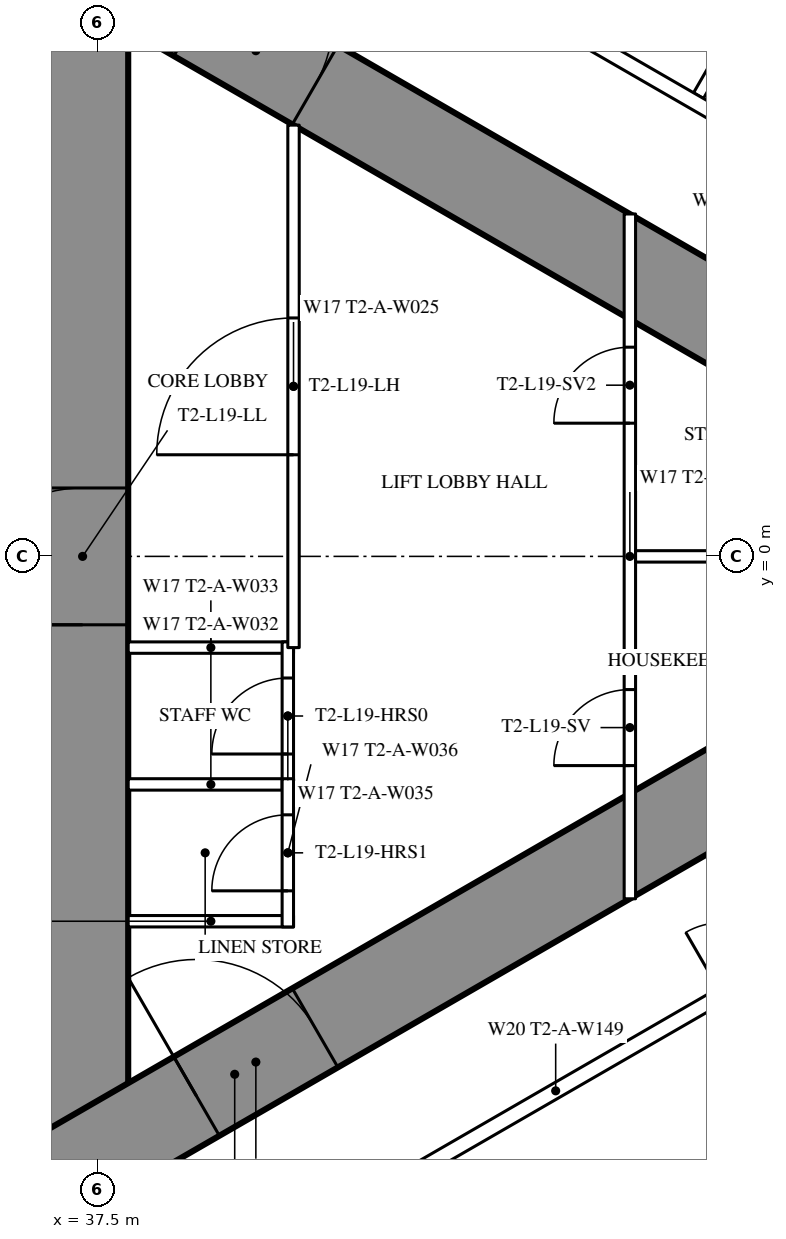
"""IFC4 building model, lengths in metres.
Left out: names, types, materials, properties, quantities, classifications, styles, units other than length and angle.
Written with IfcOpenShell. Run it as: python <this file> out.ifc"""

import sys

from ifc_helpers import new_model, si_unit, direction, frame, frame_2d, origin, place, context, subcontext, project, spatial, rectangle, extrude, element, fill, save


model = new_model("IFC4")
c1 = context("Model", 3, precision=1e-05, world=origin(), true_north=direction((0.0, 1.0)))
c2 = subcontext(c1, "Body", "Model", "MODEL_VIEW")
j1 = project(units=[si_unit("LENGTHUNIT", "METRE"), si_unit("PLANEANGLEUNIT", "RADIAN")], contexts=[c1])
p1 = place(None, origin())
s1 = spatial("IfcSite", under=j1, at=p1, CompositionType="ELEMENT")
p2 = place(p1, origin())
s2 = spatial("IfcBuilding", under=s1, at=p2, CompositionType="ELEMENT")
p3 = place(p2, frame((0.0, 0.0, 74.0)))
s3 = spatial("IfcBuildingStorey", under=s2, at=p3, CompositionType="ELEMENT", Elevation=74.0)
p4 = place(p3, frame((37.3, -8.6, 0.0), z_axis=(0.0, 0.0, 1.0), x_axis=(0.0, 1.0, 0.0)))
e1 = element("IfcWall", 1, at=p4, inside=s3, PredefinedType="SHEAR", context=c2, shape_type="SweptSolid", body=[
    extrude(rectangle(XDim=17.2, YDim=1.2, at=frame_2d((8.6, 0.0))), origin(), (0.0, 0.0, 1.0), 3.5),
])
p5 = place(p4, frame((7.7, 0.0, 0.0)))
e2 = element("IfcOpeningElement", 2, at=p5, cuts=e1, PredefinedType="OPENING", context=c2, shape_type="SweptSolid", body=[
    extrude(rectangle(XDim=1.8, YDim=2.2, at=frame_2d((0.9, 1.1))), frame((0.0, 0.61, 0.0), z_axis=(0.0, -1.0, 0.0), x_axis=(1.0, 0.0, 0.0)), (0.0, 0.0, 1.0), 1.22),
])
p6 = place(p3, frame((27.2, -13.8, 0.0), z_axis=(0.0, 0.0, 1.0), x_axis=(0.866027159892, 0.499996958321, 0.0)))
e3 = element("IfcWall", 3, at=p6, inside=s3, PredefinedType="SHEAR", context=c2, shape_type="SweptSolid", body=[
    extrude(rectangle(XDim=27.947, YDim=1.2, at=frame_2d((13.973, 0.0))), origin(), (0.0, 0.0, 1.0), 3.5),
])
p7 = place(p6, frame((4.6, 0.0, 0.0)))
e4 = element("IfcOpeningElement", 4, at=p7, cuts=e3, PredefinedType="OPENING", context=c2, shape_type="SweptSolid", body=[
    extrude(rectangle(XDim=1.0, YDim=2.2, at=frame_2d((0.5, 1.1))), frame((0.0, 0.61, 0.0), z_axis=(0.0, -1.0, 0.0), x_axis=(1.0, 0.0, 0.0)), (0.0, 0.0, 1.0), 1.22),
])
p8 = place(p6, frame((13.395, 0.0, 0.0)))
e5 = element("IfcOpeningElement", 5, at=p8, cuts=e3, PredefinedType="OPENING", context=c2, shape_type="SweptSolid", body=[
    extrude(rectangle(XDim=1.8, YDim=2.2, at=frame_2d((0.9, 1.1))), frame((0.0, 0.61, 0.0), z_axis=(0.0, -1.0, 0.0), x_axis=(1.0, 0.0, 0.0)), (0.0, 0.0, 1.0), 1.22),
])
p9 = place(p3, frame((27.2, 13.8, 0.0), z_axis=(0.0, 0.0, 1.0), x_axis=(0.866024515034, -0.500001539357, 0.0)))
e6 = element("IfcWall", 6, at=p9, inside=s3, PredefinedType="SHEAR", context=c2, shape_type="SweptSolid", body=[
    extrude(rectangle(XDim=26.907, YDim=1.2, at=frame_2d((13.454, 0.0))), origin(), (0.0, 0.0, 1.0), 3.5),
])
p10 = place(p9, frame((4.6, 0.0, 0.0)))
e7 = element("IfcOpeningElement", 7, at=p10, cuts=e6, PredefinedType="OPENING", context=c2, shape_type="SweptSolid", body=[
    extrude(rectangle(XDim=1.0, YDim=2.2, at=frame_2d((0.5, 1.1))), frame((0.0, 0.61, 0.0), z_axis=(0.0, -1.0, 0.0), x_axis=(1.0, 0.0, 0.0)), (0.0, 0.0, 1.0), 1.22),
])
p11 = place(p9, frame((13.395, 0.0, 0.0)))
e8 = element("IfcOpeningElement", 8, at=p11, cuts=e6, PredefinedType="OPENING", context=c2, shape_type="SweptSolid", body=[
    extrude(rectangle(XDim=1.8, YDim=2.2, at=frame_2d((0.9, 1.1))), frame((0.0, 0.61, 0.0), z_axis=(0.0, -1.0, 0.0), x_axis=(1.0, 0.0, 0.0)), (0.0, 0.0, 1.0), 1.22),
])
p12 = place(p3, frame((45.403, 6.062, 0.0), z_axis=(0.0, 0.0, 1.0), x_axis=(0.500013434677, 0.866017647131, 0.0)))
e9 = element("IfcWall", 9, at=p12, inside=s3, PredefinedType="PARTITIONING", context=c2, shape_type="SweptSolid", body=[
    extrude(rectangle(XDim=9.902, YDim=0.15, at=frame_2d((4.951, 0.0))), origin(), (0.0, 0.0, 1.0), 2.25),
])
p13 = place(p3, frame((36.834, 10.894, 0.0), z_axis=(0.0, 0.0, 1.0), x_axis=(0.866028157229, -0.499995230863, 0.0)))
e10 = element("IfcWall", 10, at=p13, inside=s3, PredefinedType="PARTITIONING", context=c2, shape_type="SweptSolid", body=[
    extrude(rectangle(XDim=21.667, YDim=0.2, at=frame_2d((10.833, 0.0))), origin(), (0.0, 0.0, 1.0), 3.25),
])
p14 = place(p13, frame((18.885, 0.0, 0.0)))
e11 = element("IfcOpeningElement", 11, at=p14, cuts=e10, PredefinedType="OPENING", context=c2, shape_type="SweptSolid", body=[
    extrude(rectangle(XDim=0.95, YDim=2.2, at=frame_2d((0.475, 1.1))), frame((0.0, 0.11, 0.0), z_axis=(0.0, -1.0, 0.0), x_axis=(1.0, 0.0, 0.0)), (0.0, 0.0, 1.0), 0.22),
])
p15 = place(p13, frame((15.443, 0.0, 0.0)))
e12 = element("IfcOpeningElement", 12, at=p15, cuts=e10, PredefinedType="OPENING", context=c2, shape_type="SweptSolid", body=[
    extrude(rectangle(XDim=1.8, YDim=2.2, at=frame_2d((0.9, 1.1))), frame((0.0, 0.11, 0.0), z_axis=(0.0, -1.0, 0.0), x_axis=(1.0, 0.0, 0.0)), (0.0, 0.0, 1.0), 0.22),
])
p16 = place(p13, frame((12.562, 0.0, 0.0)))
e13 = element("IfcOpeningElement", 13, at=p16, cuts=e10, PredefinedType="OPENING", context=c2, shape_type="SweptSolid", body=[
    extrude(rectangle(XDim=0.95, YDim=2.2, at=frame_2d((0.475, 1.1))), frame((0.0, 0.11, 0.0), z_axis=(0.0, -1.0, 0.0), x_axis=(1.0, 0.0, 0.0)), (0.0, 0.0, 1.0), 0.22),
])
p17 = place(p13, frame((4.292, 0.0, 0.0)))
e14 = element("IfcOpeningElement", 14, at=p17, cuts=e10, PredefinedType="OPENING", context=c2, shape_type="SweptSolid", body=[
    extrude(rectangle(XDim=1.0, YDim=2.2, at=frame_2d((0.5, 1.1))), frame((0.0, 0.11, 0.0), z_axis=(0.0, -1.0, 0.0), x_axis=(1.0, 0.0, 0.0)), (0.0, 0.0, 1.0), 0.22),
])
p18 = place(p3, frame((37.96, -10.243, 0.0), z_axis=(0.0, 0.0, 1.0), x_axis=(0.866030548046, 0.499991089772, 0.0)))
e15 = element("IfcWall", 15, at=p18, inside=s3, PredefinedType="PARTITIONING", context=c2, shape_type="SweptSolid", body=[
    extrude(rectangle(XDim=12.849, YDim=0.2, at=frame_2d((6.425, 0.0))), origin(), (0.0, 0.0, 1.0), 3.25),
])
p19 = place(p18, frame((8.949, 0.0, 0.0)))
e16 = element("IfcOpeningElement", 16, at=p19, cuts=e15, PredefinedType="OPENING", context=c2, shape_type="SweptSolid", body=[
    extrude(rectangle(XDim=0.95, YDim=2.2, at=frame_2d((0.475, 1.1))), frame((0.0, 0.11, 0.0), z_axis=(0.0, -1.0, 0.0), x_axis=(1.0, 0.0, 0.0)), (0.0, 0.0, 1.0), 0.22),
])
p20 = place(p18, frame((0.6, 0.0, 0.0)))
e17 = element("IfcOpeningElement", 17, at=p20, cuts=e15, PredefinedType="OPENING", context=c2, shape_type="SweptSolid", body=[
    extrude(rectangle(XDim=0.95, YDim=2.2, at=frame_2d((0.475, 1.1))), frame((0.0, 0.11, 0.0), z_axis=(0.0, -1.0, 0.0), x_axis=(1.0, 0.0, 0.0)), (0.0, 0.0, 1.0), 0.22),
])
for number, where, z_axis, x_axis in (
    (18, (37.9, -1.2, 0.0), (0.0, 0.0, 1.0), (1.0, 0.0, 0.0)),
    (19, (37.9, -3.0, 0.0), (0.0, 0.0, 1.0), (1.0, 0.0, 0.0)),
    (20, (37.9, -4.8, 0.0), (0.0, 0.0, 1.0), (1.0, 0.0, 0.0)),
):
    element("IfcWall", number, at=place(p3, frame(where, z_axis=z_axis, x_axis=x_axis)), inside=s3, PredefinedType="PARTITIONING", context=c2, shape_type="SweptSolid", body=[
        extrude(rectangle(XDim=2.175, YDim=0.15, at=frame_2d((1.087, 0.0))), origin(), (0.0, 0.0, 1.0), 3.25),
    ])
p21 = place(p3, frame((40.0, -3.075, 0.0), z_axis=(0.0, 0.0, 1.0), x_axis=(0.0, 1.0, 0.0)))
e21 = element("IfcWall", 21, at=p21, inside=s3, PredefinedType="PARTITIONING", context=c2, shape_type="SweptSolid", body=[
    extrude(rectangle(XDim=1.95, YDim=0.15, at=frame_2d((0.975, 0.0))), origin(), (0.0, 0.0, 1.0), 3.25),
])
p22 = place(p21, frame((0.475, 0.0, 0.0)))
e22 = element("IfcOpeningElement", 22, at=p22, cuts=e21, PredefinedType="OPENING", context=c2, shape_type="SweptSolid", body=[
    extrude(rectangle(XDim=1.0, YDim=2.2, at=frame_2d((0.5, 1.1))), frame((0.0, 0.085, 0.0), z_axis=(0.0, -1.0, 0.0), x_axis=(1.0, 0.0, 0.0)), (0.0, 0.0, 1.0), 0.17),
])
p23 = place(p3, frame((40.0, -4.875, 0.0), z_axis=(0.0, 0.0, 1.0), x_axis=(0.0, 1.0, 0.0)))
e23 = element("IfcWall", 23, at=p23, inside=s3, PredefinedType="PARTITIONING", context=c2, shape_type="SweptSolid", body=[
    extrude(rectangle(XDim=1.95, YDim=0.15, at=frame_2d((0.975, 0.0))), origin(), (0.0, 0.0, 1.0), 3.25),
])
p24 = place(p23, frame((0.475, 0.0, 0.0)))
e24 = element("IfcOpeningElement", 24, at=p24, cuts=e23, PredefinedType="OPENING", context=c2, shape_type="SweptSolid", body=[
    extrude(rectangle(XDim=1.0, YDim=2.2, at=frame_2d((0.5, 1.1))), frame((0.0, 0.085, 0.0), z_axis=(0.0, -1.0, 0.0), x_axis=(1.0, 0.0, 0.0)), (0.0, 0.0, 1.0), 0.17),
])
p25 = place(p3, frame((40.075, -1.2, 0.0), z_axis=(0.0, 0.0, 1.0), x_axis=(0.0, 1.0, 0.0)))
e25 = element("IfcWall", 25, at=p25, inside=s3, PredefinedType="PARTITIONING", context=c2, shape_type="SweptSolid", body=[
    extrude(rectangle(XDim=6.874, YDim=0.15, at=frame_2d((3.437, 0.0))), origin(), (0.0, 0.0, 1.0), 3.25),
])
p26 = place(p25, frame((2.537, 0.0, 0.0)))
e26 = element("IfcOpeningElement", 26, at=p26, cuts=e25, PredefinedType="OPENING", context=c2, shape_type="SweptSolid", body=[
    extrude(rectangle(XDim=1.8, YDim=2.2, at=frame_2d((0.9, 1.1))), frame((0.0, 0.085, 0.0), z_axis=(0.0, -1.0, 0.0), x_axis=(1.0, 0.0, 0.0)), (0.0, 0.0, 1.0), 0.17),
])
p27 = place(p3, frame((44.5, -4.505, 0.0), z_axis=(0.0, 0.0, 1.0), x_axis=(0.0, 1.0, 0.0)))
e27 = element("IfcWall", 27, at=p27, inside=s3, PredefinedType="PARTITIONING", context=c2, shape_type="SweptSolid", body=[
    extrude(rectangle(XDim=9.009, YDim=0.15, at=frame_2d((4.505, 0.0))), origin(), (0.0, 0.0, 1.0), 2.45),
])
p28 = place(p27, frame((1.752, 0.0, 0.0)))
e28 = element("IfcOpeningElement", 28, at=p28, cuts=e27, PredefinedType="OPENING", context=c2, shape_type="SweptSolid", body=[
    extrude(rectangle(XDim=1.0, YDim=2.2, at=frame_2d((0.5, 1.1))), frame((0.0, 0.085, 0.0), z_axis=(0.0, -1.0, 0.0), x_axis=(1.0, 0.0, 0.0)), (0.0, 0.0, 1.0), 0.17),
])
p29 = place(p27, frame((6.257, 0.0, 0.0)))
e29 = element("IfcOpeningElement", 29, at=p29, cuts=e27, PredefinedType="OPENING", context=c2, shape_type="SweptSolid", body=[
    extrude(rectangle(XDim=1.0, YDim=2.2, at=frame_2d((0.5, 1.1))), frame((0.0, 0.085, 0.0), z_axis=(0.0, -1.0, 0.0), x_axis=(1.0, 0.0, 0.0)), (0.0, 0.0, 1.0), 0.17),
])
p30 = place(p3, frame((44.575, 0.0, 0.0), z_axis=(0.0, 0.0, 1.0), x_axis=(1.0, 0.0, 0.0)))
e30 = element("IfcWall", 30, at=p30, inside=s3, PredefinedType="PARTITIONING", context=c2, shape_type="SweptSolid", body=[
    extrude(rectangle(XDim=7.727, YDim=0.15, at=frame_2d((3.864, 0.0))), origin(), (0.0, 0.0, 1.0), 2.25),
])
p31 = place(p22, origin())
e31 = element("IfcDoor", 31, at=p31, inside=s3, OperationType="SINGLE_SWING_LEFT", PredefinedType="DOOR", context=c2, shape_type="SweptSolid", body=[
    extrude(rectangle(XDim=1.0, YDim=2.2, at=frame_2d((0.5, 1.1))), frame((0.0, 0.025, 0.0), z_axis=(0.0, -1.0, 0.0), x_axis=(1.0, 0.0, 0.0)), (0.0, 0.0, 1.0), 0.05),
])
fill(e22, e31)
p32 = place(p24, origin())
e32 = element("IfcDoor", 32, at=p32, inside=s3, OperationType="SINGLE_SWING_LEFT", PredefinedType="DOOR", context=c2, shape_type="SweptSolid", body=[
    extrude(rectangle(XDim=1.0, YDim=2.2, at=frame_2d((0.5, 1.1))), frame((0.0, 0.025, 0.0), z_axis=(0.0, -1.0, 0.0), x_axis=(1.0, 0.0, 0.0)), (0.0, 0.0, 1.0), 0.05),
])
fill(e24, e32)
p33 = place(p26, origin())
e33 = element("IfcDoor", 33, at=p33, inside=s3, OperationType="DOUBLE_DOOR_SINGLE_SWING", PredefinedType="DOOR", context=c2, shape_type="SweptSolid", body=[
    extrude(rectangle(XDim=1.8, YDim=2.2, at=frame_2d((0.9, 1.1))), frame((0.0, 0.025, 0.0), z_axis=(0.0, -1.0, 0.0), x_axis=(1.0, 0.0, 0.0)), (0.0, 0.0, 1.0), 0.05),
])
fill(e26, e33)
p34 = place(p28, origin())
e34 = element("IfcDoor", 34, at=p34, inside=s3, OperationType="SINGLE_SWING_LEFT", PredefinedType="DOOR", context=c2, shape_type="SweptSolid", body=[
    extrude(rectangle(XDim=1.0, YDim=2.2, at=frame_2d((0.5, 1.1))), frame((0.0, 0.025, 0.0), z_axis=(0.0, -1.0, 0.0), x_axis=(1.0, 0.0, 0.0)), (0.0, 0.0, 1.0), 0.05),
])
fill(e28, e34)
p35 = place(p29, origin())
e35 = element("IfcDoor", 35, at=p35, inside=s3, OperationType="SINGLE_SWING_LEFT", PredefinedType="DOOR", context=c2, shape_type="SweptSolid", body=[
    extrude(rectangle(XDim=1.0, YDim=2.2, at=frame_2d((0.5, 1.1))), frame((0.0, 0.025, 0.0), z_axis=(0.0, -1.0, 0.0), x_axis=(1.0, 0.0, 0.0)), (0.0, 0.0, 1.0), 0.05),
])
fill(e29, e35)
p36 = place(p8, origin())
e36 = element("IfcDoor", 36, at=p36, inside=s3, OperationType="DOUBLE_DOOR_SINGLE_SWING", PredefinedType="DOOR", context=c2, shape_type="SweptSolid", body=[
    extrude(rectangle(XDim=1.8, YDim=2.2, at=frame_2d((0.9, 1.1))), frame((0.0, 0.025, 0.0), z_axis=(0.0, -1.0, 0.0), x_axis=(1.0, 0.0, 0.0)), (0.0, 0.0, 1.0), 0.05),
])
fill(e5, e36)
p37 = place(p11, origin())
e37 = element("IfcDoor", 37, at=p37, inside=s3, OperationType="DOUBLE_DOOR_SINGLE_SWING", PredefinedType="DOOR", context=c2, shape_type="SweptSolid", body=[
    extrude(rectangle(XDim=1.8, YDim=2.2, at=frame_2d((0.9, 1.1))), frame((0.0, 0.025, 0.0), z_axis=(0.0, -1.0, 0.0), x_axis=(1.0, 0.0, 0.0)), (0.0, 0.0, 1.0), 0.05),
])
fill(e8, e37)
p38 = place(p5, origin())
e38 = element("IfcDoor", 38, at=p38, inside=s3, OperationType="DOUBLE_DOOR_SINGLE_SWING", PredefinedType="DOOR", context=c2, shape_type="SweptSolid", body=[
    extrude(rectangle(XDim=1.8, YDim=2.2, at=frame_2d((0.9, 1.1))), frame((0.0, 0.025, 0.0), z_axis=(0.0, -1.0, 0.0), x_axis=(1.0, 0.0, 0.0)), (0.0, 0.0, 1.0), 0.05),
])
fill(e2, e38)
save(model, sys.argv[1])
